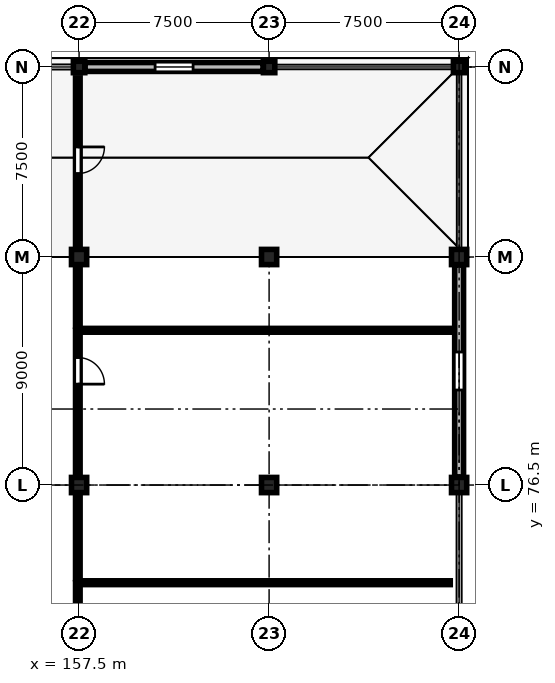
"""IFC4 building model, lengths in metres.
Left out: names, types, materials, properties, quantities, classifications, styles, units other than length and angle.
Written with IfcOpenShell. Run it as: python <this file> out.ifc"""

import sys

from ifc_helpers import new_model, si_unit, direction, frame, frame_2d, origin, origin_2d, place, context, subcontext, project, spatial, rectangle, circle, extrude, element, fill, save


model = new_model("IFC4")
c1 = context("Model", 3, precision=1e-05, world=origin(), true_north=direction((0.0, 1.0)))
c2 = subcontext(c1, "Body", "Model", "MODEL_VIEW")
j1 = project(units=[si_unit("LENGTHUNIT", "METRE"), si_unit("PLANEANGLEUNIT", "RADIAN")], contexts=[c1])
p1 = place(None, origin())
s1 = spatial("IfcSite", under=j1, at=p1, CompositionType="ELEMENT")
p2 = place(p1, origin())
s2 = spatial("IfcBuilding", under=s1, at=p2, CompositionType="ELEMENT")
p3 = place(p2, origin())
s3 = spatial("IfcBuildingStorey", under=s2, at=p3, CompositionType="ELEMENT", Elevation=0.0)
for number, where, z_axis, x_axis in (
    (1, (157.5, 76.5, 0.0), (0.0, 0.0, 1.0), (1.0, 0.0, 0.0)),
    (2, (157.5, 85.5, 0.0), (0.0, 0.0, 1.0), (1.0, 0.0, 0.0)),
):
    element("IfcColumn", number, at=place(p3, frame(where, z_axis=z_axis, x_axis=x_axis)), inside=s3, PredefinedType="COLUMN", context=c2, shape_type="SweptSolid", body=[
        extrude(rectangle(XDim=0.6, YDim=0.6, at=origin_2d()), origin(), (0.0, 0.0, 1.0), 4.8),
    ])
p4 = place(p3, frame((157.5, 93.0, 0.0), z_axis=(0.0, 0.0, 1.0), x_axis=(1.0, 0.0, 0.0)))
e3 = element("IfcColumn", 3, at=p4, inside=s3, PredefinedType="COLUMN", context=c2, shape_type="SweptSolid", body=[
    extrude(rectangle(XDim=0.45, YDim=0.45, at=origin_2d()), origin(), (0.0, 0.0, 1.0), 4.8),
])
p5 = place(p3, frame((165.0, 76.5, 0.0), z_axis=(0.0, 0.0, 1.0), x_axis=(1.0, 0.0, 0.0)))
e4 = element("IfcColumn", 4, at=p5, inside=s3, PredefinedType="COLUMN", context=c2, shape_type="SweptSolid", body=[
    extrude(rectangle(XDim=0.6, YDim=0.6, at=origin_2d()), origin(), (0.0, 0.0, 1.0), 4.8),
])
p6 = place(p3, frame((165.0, 85.5, 0.0), z_axis=(0.0, 0.0, 1.0), x_axis=(1.0, 0.0, 0.0)))
e5 = element("IfcColumn", 5, at=p6, inside=s3, PredefinedType="COLUMN", context=c2, shape_type="SweptSolid", body=[
    extrude(circle(Radius=0.3, at=origin_2d()), origin(), (0.0, 0.0, 1.0), 4.8),
])
p7 = place(p3, frame((165.0, 93.0, 0.0), z_axis=(0.0, 0.0, 1.0), x_axis=(1.0, 0.0, 0.0)))
e6 = element("IfcColumn", 6, at=p7, inside=s3, PredefinedType="COLUMN", context=c2, shape_type="SweptSolid", body=[
    extrude(rectangle(XDim=0.45, YDim=0.45, at=origin_2d()), origin(), (0.0, 0.0, 1.0), 4.8),
])
p8 = place(p3, frame((172.5, 76.5, 0.0), z_axis=(0.0, 0.0, 1.0), x_axis=(1.0, 0.0, 0.0)))
e7 = element("IfcColumn", 7, at=p8, inside=s3, PredefinedType="COLUMN", context=c2, shape_type="SweptSolid", body=[
    extrude(circle(Radius=0.3, at=origin_2d()), origin(), (0.0, 0.0, 1.0), 4.8),
])
p9 = place(p3, frame((172.5, 85.5, 0.0), z_axis=(0.0, 0.0, 1.0), x_axis=(1.0, 0.0, 0.0)))
e8 = element("IfcColumn", 8, at=p9, inside=s3, PredefinedType="COLUMN", context=c2, shape_type="SweptSolid", body=[
    extrude(rectangle(XDim=0.6, YDim=0.6, at=origin_2d()), origin(), (0.0, 0.0, 1.0), 4.8),
])
p10 = place(p3, frame((172.5, 93.0, 0.0), z_axis=(0.0, 0.0, 1.0), x_axis=(1.0, 0.0, 0.0)))
e9 = element("IfcColumn", 9, at=p10, inside=s3, PredefinedType="COLUMN", context=c2, shape_type="SweptSolid", body=[
    extrude(rectangle(XDim=0.45, YDim=0.45, at=origin_2d()), origin(), (0.0, 0.0, 1.0), 4.8),
])
p11 = place(p3, frame((157.735, 93.0, 0.0), z_axis=(0.0, 0.0, 1.0), x_axis=(1.0, 0.0, 0.0)))
e10 = element("IfcWall", 10, at=p11, inside=s3, PredefinedType="STANDARD", context=c2, shape_type="SweptSolid", body=[
    extrude(rectangle(XDim=7.03, YDim=0.35, at=frame_2d((3.515, 0.0))), origin(), (0.0, 0.0, 1.0), 4.5),
])
p12 = place(p11, frame((2.765, 0.0, 0.9)))
e11 = element("IfcOpeningElement", 11, at=p12, cuts=e10, PredefinedType="OPENING", context=c2, shape_type="SweptSolid", body=[
    extrude(rectangle(XDim=1.5, YDim=2.4, at=frame_2d((0.75, 1.2))), frame((0.0, 0.185, 0.0), z_axis=(0.0, -1.0, 0.0), x_axis=(1.0, 0.0, 0.0)), (0.0, 0.0, 1.0), 0.37),
])
p13 = place(p3, frame((172.5, 85.19, 0.0), z_axis=(0.0, 0.0, 1.0), x_axis=(0.0, -1.0, 0.0)))
e12 = element("IfcWall", 12, at=p13, inside=s3, PredefinedType="STANDARD", context=c2, shape_type="SweptSolid", body=[
    extrude(rectangle(XDim=8.38, YDim=0.35, at=frame_2d((4.19, 0.0))), origin(), (0.0, 0.0, 1.0), 3.95),
])
p14 = place(p13, frame((3.44, 0.0, 0.9)))
e13 = element("IfcOpeningElement", 13, at=p14, cuts=e12, PredefinedType="OPENING", context=c2, shape_type="SweptSolid", body=[
    extrude(rectangle(XDim=1.5, YDim=2.4, at=frame_2d((0.75, 1.2))), frame((0.0, 0.185, 0.0), z_axis=(0.0, -1.0, 0.0), x_axis=(1.0, 0.0, 0.0)), (0.0, 0.0, 1.0), 0.37),
])
p15 = place(p3, frame((157.45, 72.645, 0.0), z_axis=(0.0, 0.0, 1.0), x_axis=(0.0, -1.0, 0.0)))
e14 = element("IfcWall", 14, at=p15, inside=s3, PredefinedType="PARTITIONING", context=c2, shape_type="SweptSolid", body=[
    extrude(rectangle(XDim=9.802, YDim=0.18, at=frame_2d((4.901, 0.0))), origin(), (0.0, 0.0, 1.0), 3.935),
])
p16 = place(p15, frame((6.852, 0.0, 0.0)))
e15 = element("IfcOpeningElement", 15, at=p16, cuts=e14, PredefinedType="OPENING", context=c2, shape_type="SweptSolid", body=[
    extrude(rectangle(XDim=1.05, YDim=2.2, at=frame_2d((0.525, 1.1))), frame((0.0, 0.1, 0.0), z_axis=(0.0, -1.0, 0.0), x_axis=(1.0, 0.0, 0.0)), (0.0, 0.0, 1.0), 0.2),
])
p17 = place(p3, frame((157.45, 82.607, 0.0), z_axis=(0.0, 0.0, 1.0), x_axis=(0.0, -1.0, 0.0)))
e16 = element("IfcWall", 16, at=p17, inside=s3, PredefinedType="PARTITIONING", context=c2, shape_type="SweptSolid", body=[
    extrude(rectangle(XDim=9.802, YDim=0.18, at=frame_2d((4.901, 0.0))), origin(), (0.0, 0.0, 1.0), 3.785),
])
p18 = place(p17, frame((1.075, 0.0, 0.0)))
e17 = element("IfcOpeningElement", 17, at=p18, cuts=e16, PredefinedType="OPENING", context=c2, shape_type="SweptSolid", body=[
    extrude(rectangle(XDim=1.05, YDim=2.2, at=frame_2d((0.525, 1.1))), frame((0.0, 0.1, 0.0), z_axis=(0.0, -1.0, 0.0), x_axis=(1.0, 0.0, 0.0)), (0.0, 0.0, 1.0), 0.2),
])
p19 = place(p3, frame((157.45, 92.57, 0.0), z_axis=(0.0, 0.0, 1.0), x_axis=(0.0, -1.0, 0.0)))
e18 = element("IfcWall", 18, at=p19, inside=s3, PredefinedType="PARTITIONING", context=c2, shape_type="SweptSolid", body=[
    extrude(rectangle(XDim=9.802, YDim=0.18, at=frame_2d((4.901, 0.0))), origin(), (0.0, 0.0, 1.0), 3.785),
])
p20 = place(p19, frame((2.726, 0.0, 0.0)))
e19 = element("IfcOpeningElement", 19, at=p20, cuts=e18, PredefinedType="OPENING", context=c2, shape_type="SweptSolid", body=[
    extrude(rectangle(XDim=1.05, YDim=2.2, at=frame_2d((0.525, 1.1))), frame((0.0, 0.1, 0.0), z_axis=(0.0, -1.0, 0.0), x_axis=(1.0, 0.0, 0.0)), (0.0, 0.0, 1.0), 0.2),
])
for number, where, z_axis, x_axis in (
    (20, (157.45, 72.645, 0.0), (0.0, 0.0, 1.0), (1.0, 0.0, 0.0)),
    (21, (157.45, 82.607, 0.0), (0.0, 0.0, 1.0), (1.0, 0.0, 0.0)),
):
    element("IfcWall", number, at=place(p3, frame(where, z_axis=z_axis, x_axis=x_axis)), inside=s3, PredefinedType="PARTITIONING", context=c2, shape_type="SweptSolid", body=[
        extrude(rectangle(XDim=14.7, YDim=0.15, at=frame_2d((7.35, 0.0))), origin(), (0.0, 0.0, 1.0), 4.485),
    ])
p21 = place(p12, origin())
e22 = element("IfcWindow", 22, at=p21, inside=s3, PartitioningType="SINGLE_PANEL", PredefinedType="WINDOW", context=c2, shape_type="SweptSolid", body=[
    extrude(rectangle(XDim=1.5, YDim=2.4, at=frame_2d((0.75, 1.2))), frame((0.0, 0.03, 0.0), z_axis=(0.0, -1.0, 0.0), x_axis=(1.0, 0.0, 0.0)), (0.0, 0.0, 1.0), 0.06),
])
fill(e11, e22)
p22 = place(p14, origin())
e23 = element("IfcWindow", 23, at=p22, inside=s3, PartitioningType="SINGLE_PANEL", PredefinedType="WINDOW", context=c2, shape_type="SweptSolid", body=[
    extrude(rectangle(XDim=1.5, YDim=2.4, at=frame_2d((0.75, 1.2))), frame((0.0, 0.03, 0.0), z_axis=(0.0, -1.0, 0.0), x_axis=(1.0, 0.0, 0.0)), (0.0, 0.0, 1.0), 0.06),
])
fill(e13, e23)
p23 = place(p18, origin())
e24 = element("IfcDoor", 24, at=p23, inside=s3, OperationType="SINGLE_SWING_RIGHT", PredefinedType="DOOR", context=c2, shape_type="SweptSolid", body=[
    extrude(rectangle(XDim=1.05, YDim=2.2, at=frame_2d((0.525, 1.1))), frame((0.0, 0.025, 0.0), z_axis=(0.0, -1.0, 0.0), x_axis=(1.0, 0.0, 0.0)), (0.0, 0.0, 1.0), 0.05),
])
fill(e17, e24)
p24 = place(p20, origin())
e25 = element("IfcDoor", 25, at=p24, inside=s3, OperationType="SINGLE_SWING_LEFT", PredefinedType="DOOR", context=c2, shape_type="SweptSolid", body=[
    extrude(rectangle(XDim=1.05, YDim=2.2, at=frame_2d((0.525, 1.1))), frame((0.0, 0.025, 0.0), z_axis=(0.0, -1.0, 0.0), x_axis=(1.0, 0.0, 0.0)), (0.0, 0.0, 1.0), 0.05),
])
fill(e19, e25)
save(model, sys.argv[1])
